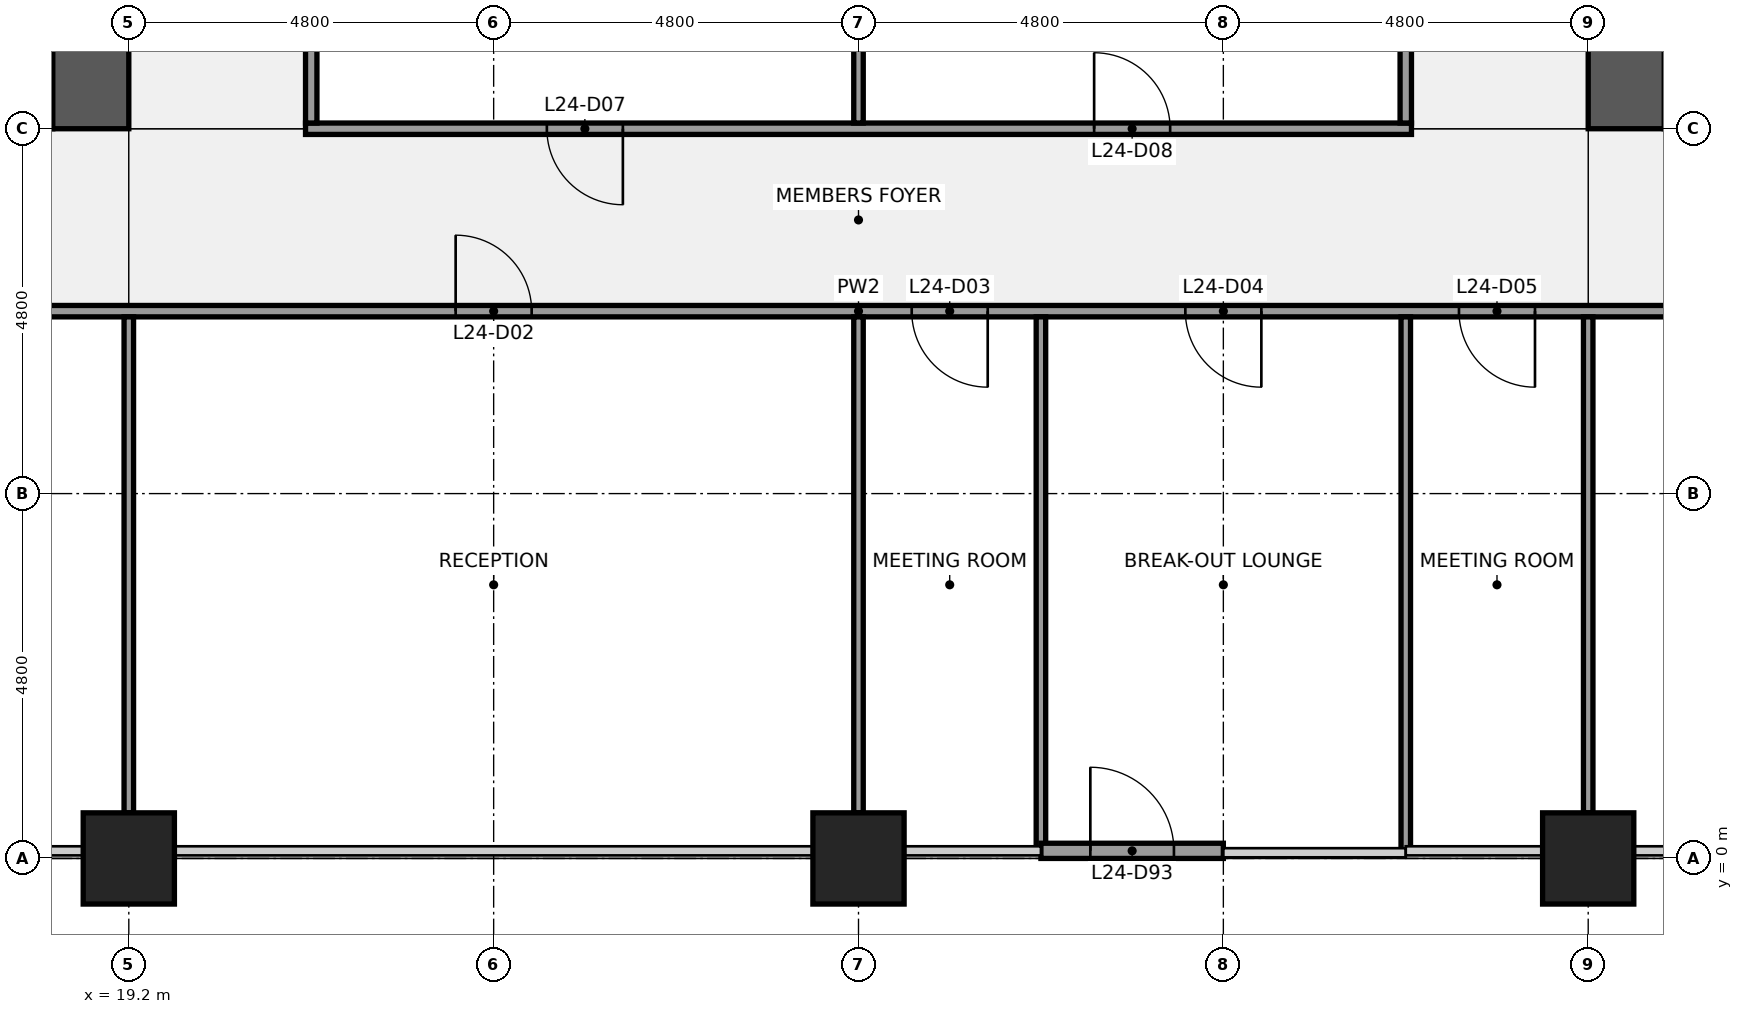
"""IFC4 building model, lengths in metres.
Left out: names, types, materials, properties, quantities, classifications, styles, units other than length and angle.
Written with IfcOpenShell. Run it as: python <this file> out.ifc"""

import sys

from ifc_helpers import new_model, si_unit, direction, frame, frame_2d, origin, origin_2d, place, context, subcontext, project, spatial, rectangle, extrude, element, fill, save


model = new_model("IFC4")
c1 = context("Model", 3, precision=1e-05, world=origin(), true_north=direction((0.0, 1.0)))
c2 = subcontext(c1, "Body", "Model", "MODEL_VIEW")
j1 = project(units=[si_unit("LENGTHUNIT", "METRE"), si_unit("PLANEANGLEUNIT", "RADIAN")], contexts=[c1])
p1 = place(None, origin())
s1 = spatial("IfcSite", under=j1, at=p1, CompositionType="ELEMENT")
p2 = place(p1, origin())
s2 = spatial("IfcBuilding", under=s1, at=p2, CompositionType="ELEMENT")
p3 = place(p2, frame((0.0, 0.0, 116.1)))
s3 = spatial("IfcBuildingStorey", under=s2, at=p3, CompositionType="ELEMENT", Elevation=116.1)
for number, where, z_axis, x_axis in (
    (1, (19.2, 0.0, 0.0), (0.0, 0.0, 1.0), (1.0, 0.0, 0.0)),
    (2, (28.8, 0.0, 0.0), (0.0, 0.0, 1.0), (1.0, 0.0, 0.0)),
    (3, (38.4, 0.0, 0.0), (0.0, 0.0, 1.0), (1.0, 0.0, 0.0)),
):
    element("IfcColumn", number, at=place(p3, frame(where, z_axis=z_axis, x_axis=x_axis)), inside=s3, PredefinedType="COLUMN", context=c2, shape_type="SweptSolid", body=[
        extrude(rectangle(XDim=1.2, YDim=1.2, at=origin_2d()), origin(), (0.0, 0.0, 1.0), 4.0),
    ])
p4 = place(p3, frame((18.2, 10.1, 0.0), z_axis=(0.0, 0.0, 1.0), x_axis=(-1.0, 0.0, 0.0)))
e4 = element("IfcWall", 4, at=p4, inside=s3, PredefinedType="SHEAR", context=c2, shape_type="SweptSolid", body=[
    extrude(rectangle(XDim=8.6, YDim=1.0, at=frame_2d((4.3, 0.0))), origin(), (0.0, 0.0, 1.0), 3.84),
])
p5 = place(p4, frame((0.85, 0.0, 0.0)))
e5 = element("IfcOpeningElement", 5, at=p5, cuts=e4, PredefinedType="OPENING", context=c2, shape_type="SweptSolid", body=[
    extrude(rectangle(XDim=1.1, YDim=2.1, at=frame_2d((0.55, 1.05))), frame((0.0, 0.51, 0.0), z_axis=(0.0, -1.0, 0.0), x_axis=(1.0, 0.0, 0.0)), (0.0, 0.0, 1.0), 1.02),
])
p6 = place(p3, frame((18.7, 38.4, 0.0), z_axis=(0.0, 0.0, 1.0), x_axis=(0.0, -1.0, 0.0)))
e6 = element("IfcWall", 6, at=p6, inside=s3, PredefinedType="SHEAR", context=c2, shape_type="SweptSolid", body=[
    extrude(rectangle(XDim=28.8, YDim=1.0, at=frame_2d((14.4, 0.0))), origin(), (0.0, 0.0, 1.0), 3.84),
])
p7 = place(p6, frame((18.3, 0.0, 0.0)))
e7 = element("IfcOpeningElement", 7, at=p7, cuts=e6, PredefinedType="OPENING", context=c2, shape_type="SweptSolid", body=[
    extrude(rectangle(XDim=1.8, YDim=2.1, at=frame_2d((0.9, 1.05))), frame((0.0, 0.51, 0.0), z_axis=(0.0, -1.0, 0.0), x_axis=(1.0, 0.0, 0.0)), (0.0, 0.0, 1.0), 1.02),
])
p8 = place(p6, frame((8.7, 0.0, 0.0)))
e8 = element("IfcOpeningElement", 8, at=p8, cuts=e6, PredefinedType="OPENING", context=c2, shape_type="SweptSolid", body=[
    extrude(rectangle(XDim=1.8, YDim=2.1, at=frame_2d((0.9, 1.05))), frame((0.0, 0.51, 0.0), z_axis=(0.0, -1.0, 0.0), x_axis=(1.0, 0.0, 0.0)), (0.0, 0.0, 1.0), 1.02),
])
p9 = place(p3, frame((52.8, 10.1, 0.0), z_axis=(0.0, 0.0, 1.0), x_axis=(-1.0, 0.0, 0.0)))
e9 = element("IfcWall", 9, at=p9, inside=s3, PredefinedType="SHEAR", context=c2, shape_type="SweptSolid", body=[
    extrude(rectangle(XDim=13.4, YDim=1.0, at=frame_2d((6.7, 0.0))), origin(), (0.0, 0.0, 1.0), 3.84),
])
p10 = place(p9, frame((11.45, 0.0, 0.0)))
e10 = element("IfcOpeningElement", 10, at=p10, cuts=e9, PredefinedType="OPENING", context=c2, shape_type="SweptSolid", body=[
    extrude(rectangle(XDim=1.1, YDim=2.1, at=frame_2d((0.55, 1.05))), frame((0.0, 0.51, 0.0), z_axis=(0.0, -1.0, 0.0), x_axis=(1.0, 0.0, 0.0)), (0.0, 0.0, 1.0), 1.02),
])
p11 = place(p3, frame((38.9, 9.6, 0.0), z_axis=(0.0, 0.0, 1.0), x_axis=(0.0, 1.0, 0.0)))
e11 = element("IfcWall", 11, at=p11, inside=s3, PredefinedType="SHEAR", context=c2, shape_type="SweptSolid", body=[
    extrude(rectangle(XDim=28.8, YDim=1.0, at=frame_2d((14.4, 0.0))), origin(), (0.0, 0.0, 1.0), 3.84),
])
p12 = place(p11, frame((8.7, 0.0, 0.0)))
e12 = element("IfcOpeningElement", 12, at=p12, cuts=e11, PredefinedType="OPENING", context=c2, shape_type="SweptSolid", body=[
    extrude(rectangle(XDim=1.8, YDim=2.1, at=frame_2d((0.9, 1.05))), frame((0.0, 0.51, 0.0), z_axis=(0.0, -1.0, 0.0), x_axis=(1.0, 0.0, 0.0)), (0.0, 0.0, 1.0), 1.02),
])
p13 = place(p11, frame((18.3, 0.0, 0.0)))
e13 = element("IfcOpeningElement", 13, at=p13, cuts=e11, PredefinedType="OPENING", context=c2, shape_type="SweptSolid", body=[
    extrude(rectangle(XDim=1.8, YDim=2.1, at=frame_2d((0.9, 1.05))), frame((0.0, 0.51, 0.0), z_axis=(0.0, -1.0, 0.0), x_axis=(1.0, 0.0, 0.0)), (0.0, 0.0, 1.0), 1.02),
])
p14 = place(p3, frame((14.325, 7.2, 0.0), z_axis=(0.0, 0.0, 1.0), x_axis=(1.0, 0.0, 0.0)))
e14 = element("IfcWall", 14, at=p14, inside=s3, PredefinedType="PARTITIONING", context=c2, shape_type="SweptSolid", body=[
    extrude(rectangle(XDim=28.95, YDim=0.15, at=frame_2d((14.475, 0.0))), origin(), (0.0, 0.0, 1.0), 2.936),
])
p15 = place(p14, frame((1.975, 0.0, 0.0)))
e15 = element("IfcOpeningElement", 15, at=p15, cuts=e14, PredefinedType="OPENING", context=c2, shape_type="SweptSolid", body=[
    extrude(rectangle(XDim=1.0, YDim=2.1, at=frame_2d((0.5, 1.05))), frame((0.0, 0.085, 0.0), z_axis=(0.0, -1.0, 0.0), x_axis=(1.0, 0.0, 0.0)), (0.0, 0.0, 1.0), 0.17),
])
p16 = place(p14, frame((9.175, 0.0, 0.0)))
e16 = element("IfcOpeningElement", 16, at=p16, cuts=e14, PredefinedType="OPENING", context=c2, shape_type="SweptSolid", body=[
    extrude(rectangle(XDim=1.0, YDim=2.1, at=frame_2d((0.5, 1.05))), frame((0.0, 0.085, 0.0), z_axis=(0.0, -1.0, 0.0), x_axis=(1.0, 0.0, 0.0)), (0.0, 0.0, 1.0), 0.17),
])
p17 = place(p14, frame((15.175, 0.0, 0.0)))
e17 = element("IfcOpeningElement", 17, at=p17, cuts=e14, PredefinedType="OPENING", context=c2, shape_type="SweptSolid", body=[
    extrude(rectangle(XDim=1.0, YDim=2.1, at=frame_2d((0.5, 1.05))), frame((0.0, 0.085, 0.0), z_axis=(0.0, -1.0, 0.0), x_axis=(1.0, 0.0, 0.0)), (0.0, 0.0, 1.0), 0.17),
])
p18 = place(p14, frame((18.775, 0.0, 0.0)))
e18 = element("IfcOpeningElement", 18, at=p18, cuts=e14, PredefinedType="OPENING", context=c2, shape_type="SweptSolid", body=[
    extrude(rectangle(XDim=1.0, YDim=2.1, at=frame_2d((0.5, 1.05))), frame((0.0, 0.085, 0.0), z_axis=(0.0, -1.0, 0.0), x_axis=(1.0, 0.0, 0.0)), (0.0, 0.0, 1.0), 0.17),
])
p19 = place(p14, frame((22.375, 0.0, 0.0)))
e19 = element("IfcOpeningElement", 19, at=p19, cuts=e14, PredefinedType="OPENING", context=c2, shape_type="SweptSolid", body=[
    extrude(rectangle(XDim=1.0, YDim=2.1, at=frame_2d((0.5, 1.05))), frame((0.0, 0.085, 0.0), z_axis=(0.0, -1.0, 0.0), x_axis=(1.0, 0.0, 0.0)), (0.0, 0.0, 1.0), 0.17),
])
p20 = place(p14, frame((25.975, 0.0, 0.0)))
e20 = element("IfcOpeningElement", 20, at=p20, cuts=e14, PredefinedType="OPENING", context=c2, shape_type="SweptSolid", body=[
    extrude(rectangle(XDim=1.0, YDim=2.1, at=frame_2d((0.5, 1.05))), frame((0.0, 0.085, 0.0), z_axis=(0.0, -1.0, 0.0), x_axis=(1.0, 0.0, 0.0)), (0.0, 0.0, 1.0), 0.17),
])
p21 = place(p3, frame((21.525, 9.6, 0.0), z_axis=(0.0, 0.0, 1.0), x_axis=(1.0, 0.0, 0.0)))
e21 = element("IfcWall", 21, at=p21, inside=s3, PredefinedType="PARTITIONING", context=c2, shape_type="SweptSolid", body=[
    extrude(rectangle(XDim=14.55, YDim=0.15, at=frame_2d((7.275, 0.0))), origin(), (0.0, 0.0, 1.0), 2.936),
])
p22 = place(p21, frame((3.175, 0.0, 0.0)))
e22 = element("IfcOpeningElement", 22, at=p22, cuts=e21, PredefinedType="OPENING", context=c2, shape_type="SweptSolid", body=[
    extrude(rectangle(XDim=1.0, YDim=2.1, at=frame_2d((0.5, 1.05))), frame((0.0, 0.085, 0.0), z_axis=(0.0, -1.0, 0.0), x_axis=(1.0, 0.0, 0.0)), (0.0, 0.0, 1.0), 0.17),
])
p23 = place(p21, frame((10.375, 0.0, 0.0)))
e23 = element("IfcOpeningElement", 23, at=p23, cuts=e21, PredefinedType="OPENING", context=c2, shape_type="SweptSolid", body=[
    extrude(rectangle(XDim=1.0, YDim=2.1, at=frame_2d((0.5, 1.05))), frame((0.0, 0.085, 0.0), z_axis=(0.0, -1.0, 0.0), x_axis=(1.0, 0.0, 0.0)), (0.0, 0.0, 1.0), 0.17),
])
p24 = place(p3, frame((19.2, 0.6, 0.0), z_axis=(0.0, 0.0, 1.0), x_axis=(0.0, 1.0, 0.0)))
e24 = element("IfcWall", 24, at=p24, inside=s3, PredefinedType="PARTITIONING", context=c2, shape_type="SweptSolid", body=[
    extrude(rectangle(XDim=6.525, YDim=0.125, at=frame_2d((3.262, 0.0))), origin(), (0.0, 0.0, 1.0), 2.936),
])
p25 = place(p3, frame((21.6, 9.675, 0.0), z_axis=(0.0, 0.0, 1.0), x_axis=(0.0, 1.0, 0.0)))
e25 = element("IfcWall", 25, at=p25, inside=s3, PredefinedType="PARTITIONING", context=c2, shape_type="SweptSolid", body=[
    extrude(rectangle(XDim=4.65, YDim=0.15, at=frame_2d((2.325, 0.0))), origin(), (0.0, 0.0, 1.0), 2.936),
])
p26 = place(p3, frame((28.8, 0.6, 0.0), z_axis=(0.0, 0.0, 1.0), x_axis=(0.0, 1.0, 0.0)))
e26 = element("IfcWall", 26, at=p26, inside=s3, PredefinedType="PARTITIONING", context=c2, shape_type="SweptSolid", body=[
    extrude(rectangle(XDim=6.525, YDim=0.125, at=frame_2d((3.262, 0.0))), origin(), (0.0, 0.0, 1.0), 2.936),
])
p27 = place(p3, frame((28.8, 9.675, 0.0), z_axis=(0.0, 0.0, 1.0), x_axis=(0.0, 1.0, 0.0)))
e27 = element("IfcWall", 27, at=p27, inside=s3, PredefinedType="PARTITIONING", context=c2, shape_type="SweptSolid", body=[
    extrude(rectangle(XDim=4.662, YDim=0.125, at=frame_2d((2.331, 0.0))), origin(), (0.0, 0.0, 1.0), 2.936),
])
for number, where, z_axis, x_axis in (
    (28, (31.2, 0.1, 0.0), (0.0, 0.0, 1.0), (0.0, 1.0, 0.0)),
    (29, (36.0, 0.1, 0.0), (0.0, 0.0, 1.0), (0.0, 1.0, 0.0)),
):
    element("IfcWall", number, at=place(p3, frame(where, z_axis=z_axis, x_axis=x_axis)), inside=s3, PredefinedType="PARTITIONING", context=c2, shape_type="SweptSolid", body=[
        extrude(rectangle(XDim=7.025, YDim=0.125, at=frame_2d((3.512, 0.0))), origin(), (0.0, 0.0, 1.0), 2.936),
    ])
p28 = place(p3, frame((36.0, 9.675, 0.0), z_axis=(0.0, 0.0, 1.0), x_axis=(0.0, 1.0, 0.0)))
e30 = element("IfcWall", 30, at=p28, inside=s3, PredefinedType="PARTITIONING", context=c2, shape_type="SweptSolid", body=[
    extrude(rectangle(XDim=4.65, YDim=0.15, at=frame_2d((2.325, 0.0))), origin(), (0.0, 0.0, 1.0), 2.936),
])
p29 = place(p3, frame((38.4, 0.6, 0.0), z_axis=(0.0, 0.0, 1.0), x_axis=(0.0, 1.0, 0.0)))
e31 = element("IfcWall", 31, at=p29, inside=s3, PredefinedType="PARTITIONING", context=c2, shape_type="SweptSolid", body=[
    extrude(rectangle(XDim=6.525, YDim=0.125, at=frame_2d((3.262, 0.0))), origin(), (0.0, 0.0, 1.0), 2.936),
])
p30 = place(p3, frame((31.2, 0.1, 0.0), z_axis=(0.0, 0.0, 1.0), x_axis=(1.0, 0.0, 0.0)))
e32 = element("IfcWall", 32, at=p30, inside=s3, PredefinedType="SOLIDWALL", context=c2, shape_type="SweptSolid", body=[
    extrude(rectangle(XDim=2.4, YDim=0.2, at=frame_2d((1.2, 0.0))), origin(), (0.0, 0.0, 1.0), 3.314),
])
p31 = place(p30, frame((0.65, 0.0, 0.0)))
e33 = element("IfcOpeningElement", 33, at=p31, cuts=e32, PredefinedType="OPENING", context=c2, shape_type="SweptSolid", body=[
    extrude(rectangle(XDim=1.1, YDim=2.1, at=frame_2d((0.55, 1.05))), frame((0.0, 0.11, 0.0), z_axis=(0.0, -1.0, 0.0), x_axis=(1.0, 0.0, 0.0)), (0.0, 0.0, 1.0), 0.22),
])
for number, where, z_axis, x_axis in (
    (34, (19.2, -1.05, 0.0), (0.0, 0.0, 1.0), (1.0, 0.0, 0.0)),
    (35, (38.4, -1.05, 0.0), (0.0, 0.0, 1.0), (1.0, 0.0, 0.0)),
):
    element("IfcColumn", number, at=place(p3, frame(where, z_axis=z_axis, x_axis=x_axis)), inside=s3, PredefinedType="PILASTER", context=c2, shape_type="SweptSolid", body=[
        extrude(rectangle(XDim=3.6, YDim=0.9, at=origin_2d()), origin(), (0.0, 0.0, 1.0), 4.0),
    ])
p32 = place(p16, origin())
e36 = element("IfcDoor", 36, at=p32, inside=s3, OperationType="SINGLE_SWING_LEFT", PredefinedType="DOOR", context=c2, shape_type="SweptSolid", body=[
    extrude(rectangle(XDim=1.0, YDim=2.1, at=frame_2d((0.5, 1.05))), frame((0.0, 0.025, 0.0), z_axis=(0.0, -1.0, 0.0), x_axis=(1.0, 0.0, 0.0)), (0.0, 0.0, 1.0), 0.05),
])
fill(e16, e36)
p33 = place(p17, origin())
e37 = element("IfcDoor", 37, at=p33, inside=s3, OperationType="SINGLE_SWING_RIGHT", PredefinedType="DOOR", context=c2, shape_type="SweptSolid", body=[
    extrude(rectangle(XDim=1.0, YDim=2.1, at=frame_2d((0.5, 1.05))), frame((0.0, 0.025, 0.0), z_axis=(0.0, -1.0, 0.0), x_axis=(1.0, 0.0, 0.0)), (0.0, 0.0, 1.0), 0.05),
])
fill(e17, e37)
p34 = place(p18, origin())
e38 = element("IfcDoor", 38, at=p34, inside=s3, OperationType="SINGLE_SWING_RIGHT", PredefinedType="DOOR", context=c2, shape_type="SweptSolid", body=[
    extrude(rectangle(XDim=1.0, YDim=2.1, at=frame_2d((0.5, 1.05))), frame((0.0, 0.025, 0.0), z_axis=(0.0, -1.0, 0.0), x_axis=(1.0, 0.0, 0.0)), (0.0, 0.0, 1.0), 0.05),
])
fill(e18, e38)
p35 = place(p19, origin())
e39 = element("IfcDoor", 39, at=p35, inside=s3, OperationType="SINGLE_SWING_RIGHT", PredefinedType="DOOR", context=c2, shape_type="SweptSolid", body=[
    extrude(rectangle(XDim=1.0, YDim=2.1, at=frame_2d((0.5, 1.05))), frame((0.0, 0.025, 0.0), z_axis=(0.0, -1.0, 0.0), x_axis=(1.0, 0.0, 0.0)), (0.0, 0.0, 1.0), 0.05),
])
fill(e19, e39)
p36 = place(p22, origin())
e40 = element("IfcDoor", 40, at=p36, inside=s3, OperationType="SINGLE_SWING_RIGHT", PredefinedType="DOOR", context=c2, shape_type="SweptSolid", body=[
    extrude(rectangle(XDim=1.0, YDim=2.1, at=frame_2d((0.5, 1.05))), frame((0.0, 0.025, 0.0), z_axis=(0.0, -1.0, 0.0), x_axis=(1.0, 0.0, 0.0)), (0.0, 0.0, 1.0), 0.05),
])
fill(e22, e40)
p37 = place(p23, origin())
e41 = element("IfcDoor", 41, at=p37, inside=s3, OperationType="SINGLE_SWING_LEFT", PredefinedType="DOOR", context=c2, shape_type="SweptSolid", body=[
    extrude(rectangle(XDim=1.0, YDim=2.1, at=frame_2d((0.5, 1.05))), frame((0.0, 0.025, 0.0), z_axis=(0.0, -1.0, 0.0), x_axis=(1.0, 0.0, 0.0)), (0.0, 0.0, 1.0), 0.05),
])
fill(e23, e41)
p38 = place(p31, origin())
e42 = element("IfcDoor", 42, at=p38, inside=s3, OperationType="SINGLE_SWING_LEFT", PredefinedType="DOOR", context=c2, shape_type="SweptSolid", body=[
    extrude(rectangle(XDim=1.1, YDim=2.1, at=frame_2d((0.55, 1.05))), frame((0.0, 0.025, 0.0), z_axis=(0.0, -1.0, 0.0), x_axis=(1.0, 0.0, 0.0)), (0.0, 0.0, 1.0), 0.05),
])
fill(e33, e42)
save(model, sys.argv[1])
